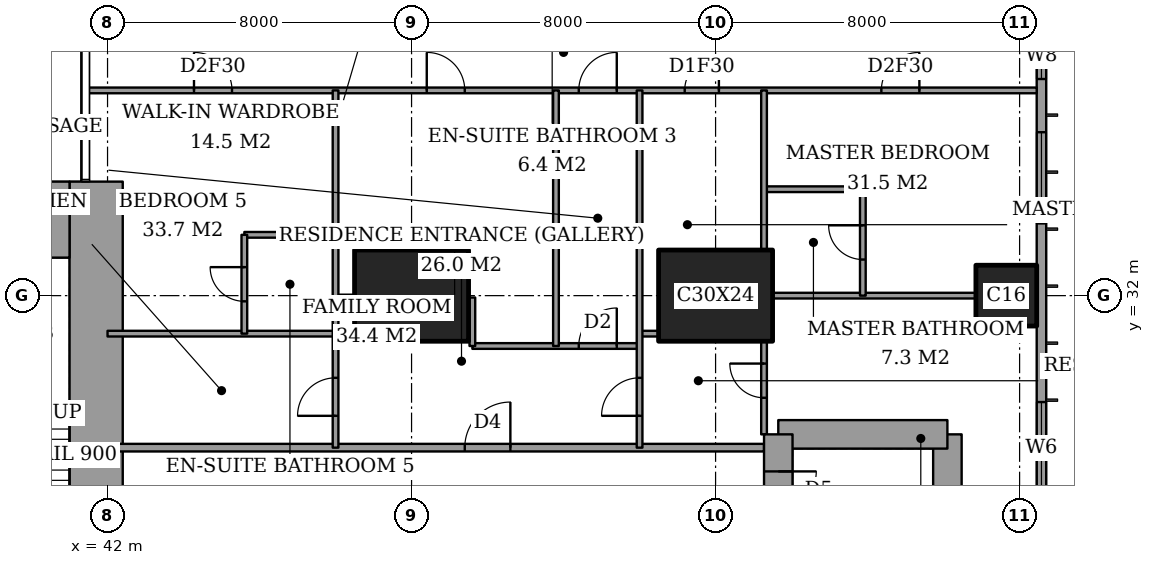
"""IFC4 building model, lengths in metres.
Left out: names, types, materials, properties, quantities, classifications, styles, units other than length and angle.
Written with IfcOpenShell. Run it as: python <this file> out.ifc"""

import sys

from ifc_helpers import new_model, si_unit, direction, frame, frame_2d, origin, origin_2d, place, context, subcontext, project, spatial, rectangle, extrude, element, fill, save


model = new_model("IFC4")
c1 = context("Model", 3, precision=1e-05, world=origin(), true_north=direction((0.0, 1.0)))
c2 = subcontext(c1, "Body", "Model", "MODEL_VIEW")
j1 = project(units=[si_unit("LENGTHUNIT", "METRE"), si_unit("PLANEANGLEUNIT", "RADIAN")], contexts=[c1])
p1 = place(None, origin())
s1 = spatial("IfcSite", under=j1, at=p1, CompositionType="ELEMENT")
p2 = place(p1, origin())
s2 = spatial("IfcBuilding", under=s1, at=p2, CompositionType="ELEMENT")
p3 = place(p2, frame((0.0, 0.0, 252.0)))
s3 = spatial("IfcBuildingStorey", under=s2, at=p3, CompositionType="ELEMENT", Elevation=252.0)
for number, where, z_axis, x_axis in (
    (1, (50.0, 32.0, 0.0), (0.0, 0.0, 1.0), (1.0, 0.0, 0.0)),
    (2, (58.0, 32.0, 0.0), (0.0, 0.0, 1.0), (1.0, 0.0, 0.0)),
):
    element("IfcColumn", number, at=place(p3, frame(where, z_axis=z_axis, x_axis=x_axis)), inside=s3, PredefinedType="COLUMN", context=c2, shape_type="SweptSolid", body=[
        extrude(rectangle(XDim=3.0, YDim=2.4, at=origin_2d()), origin(), (0.0, 0.0, 1.0), 3.6),
    ])
p4 = place(p3, frame((65.65, 32.0, 0.0), z_axis=(0.0, 0.0, 1.0), x_axis=(1.0, 0.0, 0.0)))
e3 = element("IfcColumn", 3, at=p4, inside=s3, PredefinedType="COLUMN", context=c2, shape_type="SweptSolid", body=[
    extrude(rectangle(XDim=1.6, YDim=1.6, at=origin_2d()), origin(), (0.0, 0.0, 1.0), 3.6),
])
p5 = place(p3, frame((37.85, 34.0, 0.0), z_axis=(0.0, 0.0, 1.0), x_axis=(1.0, 0.0, 0.0)))
e4 = element("IfcWall", 4, at=p5, inside=s3, PredefinedType="SHEAR", context=c2, shape_type="SweptSolid", body=[
    extrude(rectangle(XDim=3.15, YDim=2.0, at=frame_2d((1.575, 0.0))), origin(), (0.0, 0.0, 1.0), 3.6),
])
p6 = place(p3, frame((41.7, 24.85, 0.0), z_axis=(0.0, 0.0, 1.0), x_axis=(0.0, 1.0, 0.0)))
e5 = element("IfcWall", 5, at=p6, inside=s3, PredefinedType="SHEAR", context=c2, shape_type="SweptSolid", body=[
    extrude(rectangle(XDim=10.15, YDim=1.4, at=frame_2d((5.075, 0.0))), origin(), (0.0, 0.0, 1.0), 3.6),
])
p7 = place(p3, frame((64.1, 19.65, 0.0), z_axis=(0.0, 0.0, 1.0), x_axis=(0.0, 1.0, 0.0)))
e6 = element("IfcWall", 6, at=p7, inside=s3, PredefinedType="SHEAR", context=c2, shape_type="SweptSolid", body=[
    extrude(rectangle(XDim=8.7, YDim=0.75, at=frame_2d((4.35, 0.0))), origin(), (0.0, 0.0, 1.0), 3.6),
])
p8 = place(p3, frame((64.1, 28.35, 0.0), z_axis=(0.0, 0.0, 1.0), x_axis=(-1.0, 0.0, 0.0)))
e7 = element("IfcWall", 7, at=p8, inside=s3, PredefinedType="SHEAR", context=c2, shape_type="SweptSolid", body=[
    extrude(rectangle(XDim=4.45, YDim=0.75, at=frame_2d((2.225, 0.0))), origin(), (0.0, 0.0, 1.0), 3.6),
])
p9 = place(p3, frame((59.65, 28.35, 0.0), z_axis=(0.0, 0.0, 1.0), x_axis=(0.0, -1.0, 0.0)))
e8 = element("IfcWall", 8, at=p9, inside=s3, PredefinedType="SHEAR", context=c2, shape_type="SweptSolid", body=[
    extrude(rectangle(XDim=8.7, YDim=0.75, at=frame_2d((4.35, 0.0))), origin(), (0.0, 0.0, 1.0), 3.6),
])
p10 = place(p9, frame((0.975, 0.0, 0.0)))
e9 = element("IfcOpeningElement", 9, at=p10, cuts=e8, PredefinedType="OPENING", context=c2, shape_type="SweptSolid", body=[
    extrude(rectangle(XDim=1.0, YDim=2.1, at=frame_2d((0.5, 1.05))), frame((0.0, 0.385, 0.0), z_axis=(0.0, -1.0, 0.0), x_axis=(1.0, 0.0, 0.0)), (0.0, 0.0, 1.0), 0.77),
])
p11 = place(p3, frame((66.575, 3.175, 0.0), z_axis=(0.0, 0.0, 1.0), x_axis=(0.0, 1.0, 0.0)))
e10 = element("IfcWall", 10, at=p11, inside=s3, PredefinedType="SOLIDWALL", context=c2, shape_type="SweptSolid", body=[
    extrude(rectangle(XDim=41.65, YDim=0.25, at=frame_2d((20.825, 0.0))), origin(), (0.0, 0.0, 1.0), 3.6),
])
p12 = place(p11, frame((0.875, 0.0, 0.6)))
e11 = element("IfcOpeningElement", 11, at=p12, cuts=e10, PredefinedType="OPENING", context=c2, shape_type="SweptSolid", body=[
    extrude(rectangle(XDim=2.4, YDim=2.0, at=frame_2d((1.2, 1.0))), frame((0.0, 0.135, 0.0), z_axis=(0.0, -1.0, 0.0), x_axis=(1.0, 0.0, 0.0)), (0.0, 0.0, 1.0), 0.27),
])
p13 = place(p11, frame((6.6, 0.0, 0.6)))
e12 = element("IfcOpeningElement", 12, at=p13, cuts=e10, PredefinedType="OPENING", context=c2, shape_type="SweptSolid", body=[
    extrude(rectangle(XDim=1.2, YDim=2.0, at=frame_2d((0.6, 1.0))), frame((0.0, 0.135, 0.0), z_axis=(0.0, -1.0, 0.0), x_axis=(1.0, 0.0, 0.0)), (0.0, 0.0, 1.0), 0.27),
])
p14 = place(p11, frame((8.825, 0.0, 0.6)))
e13 = element("IfcOpeningElement", 13, at=p14, cuts=e10, PredefinedType="OPENING", context=c2, shape_type="SweptSolid", body=[
    extrude(rectangle(XDim=2.4, YDim=2.0, at=frame_2d((1.2, 1.0))), frame((0.0, 0.135, 0.0), z_axis=(0.0, -1.0, 0.0), x_axis=(1.0, 0.0, 0.0)), (0.0, 0.0, 1.0), 0.27),
])
p15 = place(p11, frame((15.725, 0.0, 0.6)))
e14 = element("IfcOpeningElement", 14, at=p15, cuts=e10, PredefinedType="OPENING", context=c2, shape_type="SweptSolid", body=[
    extrude(rectangle(XDim=2.4, YDim=2.0, at=frame_2d((1.2, 1.0))), frame((0.0, 0.135, 0.0), z_axis=(0.0, -1.0, 0.0), x_axis=(1.0, 0.0, 0.0)), (0.0, 0.0, 1.0), 0.27),
])
p16 = place(p11, frame((23.625, 0.0, 0.6)))
e15 = element("IfcOpeningElement", 15, at=p16, cuts=e10, PredefinedType="OPENING", context=c2, shape_type="SweptSolid", body=[
    extrude(rectangle(XDim=2.4, YDim=2.0, at=frame_2d((1.2, 1.0))), frame((0.0, 0.135, 0.0), z_axis=(0.0, -1.0, 0.0), x_axis=(1.0, 0.0, 0.0)), (0.0, 0.0, 1.0), 0.27),
])
p17 = place(p11, frame((30.725, 0.0, 0.6)))
e16 = element("IfcOpeningElement", 16, at=p17, cuts=e10, PredefinedType="OPENING", context=c2, shape_type="SweptSolid", body=[
    extrude(rectangle(XDim=2.4, YDim=2.0, at=frame_2d((1.2, 1.0))), frame((0.0, 0.135, 0.0), z_axis=(0.0, -1.0, 0.0), x_axis=(1.0, 0.0, 0.0)), (0.0, 0.0, 1.0), 0.27),
])
p18 = place(p11, frame((34.525, 0.0, 0.6)))
e17 = element("IfcOpeningElement", 17, at=p18, cuts=e10, PredefinedType="OPENING", context=c2, shape_type="SweptSolid", body=[
    extrude(rectangle(XDim=1.2, YDim=2.0, at=frame_2d((0.6, 1.0))), frame((0.0, 0.135, 0.0), z_axis=(0.0, -1.0, 0.0), x_axis=(1.0, 0.0, 0.0)), (0.0, 0.0, 1.0), 0.27),
])
p19 = place(p11, frame((38.375, 0.0, 0.6)))
e18 = element("IfcOpeningElement", 18, at=p19, cuts=e10, PredefinedType="OPENING", context=c2, shape_type="SweptSolid", body=[
    extrude(rectangle(XDim=2.4, YDim=2.0, at=frame_2d((1.2, 1.0))), frame((0.0, 0.135, 0.0), z_axis=(0.0, -1.0, 0.0), x_axis=(1.0, 0.0, 0.0)), (0.0, 0.0, 1.0), 0.27),
])
p20 = place(p3, frame((42.0, 28.0, 0.0), z_axis=(0.0, 0.0, 1.0), x_axis=(1.0, 0.0, 0.0)))
e19 = element("IfcWall", 19, at=p20, inside=s3, PredefinedType="PARTITIONING", context=c2, shape_type="SweptSolid", body=[
    extrude(rectangle(XDim=17.275, YDim=0.2, at=frame_2d((8.637, 0.0))), origin(), (0.0, 0.0, 1.0), 3.35),
])
p21 = place(p20, frame((9.4, 0.0, 0.0)))
e20 = element("IfcOpeningElement", 20, at=p21, cuts=e19, PredefinedType="OPENING", context=c2, shape_type="SweptSolid", body=[
    extrude(rectangle(XDim=1.2, YDim=2.4, at=frame_2d((0.6, 1.2))), frame((0.0, 0.11, 0.0), z_axis=(0.0, -1.0, 0.0), x_axis=(1.0, 0.0, 0.0)), (0.0, 0.0, 1.0), 0.22),
])
p22 = place(p3, frame((51.6, 30.675, 0.0), z_axis=(0.0, 0.0, 1.0), x_axis=(1.0, 0.0, 0.0)))
e21 = element("IfcWall", 21, at=p22, inside=s3, PredefinedType="PARTITIONING", context=c2, shape_type="SweptSolid", body=[
    extrude(rectangle(XDim=4.4, YDim=0.15, at=frame_2d((2.2, 0.0))), origin(), (0.0, 0.0, 1.0), 3.35),
])
p23 = place(p22, frame((2.8, 0.0, 0.0)))
e22 = element("IfcOpeningElement", 22, at=p23, cuts=e21, PredefinedType="OPENING", context=c2, shape_type="SweptSolid", body=[
    extrude(rectangle(XDim=1.0, YDim=2.1, at=frame_2d((0.5, 1.05))), frame((0.0, 0.085, 0.0), z_axis=(0.0, -1.0, 0.0), x_axis=(1.0, 0.0, 0.0)), (0.0, 0.0, 1.0), 0.17),
])
p24 = place(p3, frame((42.0, 31.0, 0.0), z_axis=(0.0, 0.0, 1.0), x_axis=(1.0, 0.0, 0.0)))
e23 = element("IfcWall", 23, at=p24, inside=s3, PredefinedType="PARTITIONING", context=c2, shape_type="SweptSolid", body=[
    extrude(rectangle(XDim=6.0, YDim=0.15, at=frame_2d((3.0, 0.0))), origin(), (0.0, 0.0, 1.0), 3.35),
])
p25 = place(p3, frame((56.0, 31.0, 0.0), z_axis=(0.0, 0.0, 1.0), x_axis=(1.0, 0.0, 0.0)))
e24 = element("IfcWall", 24, at=p25, inside=s3, PredefinedType="PARTITIONING", context=c2, shape_type="SweptSolid", body=[
    extrude(rectangle(XDim=0.5, YDim=0.15, at=frame_2d((0.25, 0.0))), origin(), (0.0, 0.0, 1.0), 3.35),
])
p26 = place(p3, frame((48.0, 31.95, 0.0), z_axis=(0.0, 0.0, 1.0), x_axis=(1.0, 0.0, 0.0)))
e25 = element("IfcWall", 25, at=p26, inside=s3, PredefinedType="PARTITIONING", context=c2, shape_type="SweptSolid", body=[
    extrude(rectangle(XDim=0.5, YDim=0.15, at=frame_2d((0.25, 0.0))), origin(), (0.0, 0.0, 1.0), 2.634),
])
p27 = place(p3, frame((59.5, 32.0, 0.0), z_axis=(0.0, 0.0, 1.0), x_axis=(1.0, 0.0, 0.0)))
e26 = element("IfcWall", 26, at=p27, inside=s3, PredefinedType="PARTITIONING", context=c2, shape_type="SweptSolid", body=[
    extrude(rectangle(XDim=5.35, YDim=0.15, at=frame_2d((2.675, 0.0))), origin(), (0.0, 0.0, 1.0), 2.634),
])
p28 = place(p3, frame((45.6, 33.6, 0.0), z_axis=(0.0, 0.0, 1.0), x_axis=(1.0, 0.0, 0.0)))
e27 = element("IfcWall", 27, at=p28, inside=s3, PredefinedType="PARTITIONING", context=c2, shape_type="SweptSolid", body=[
    extrude(rectangle(XDim=2.4, YDim=0.15, at=frame_2d((1.2, 0.0))), origin(), (0.0, 0.0, 1.0), 3.35),
])
p29 = place(p3, frame((59.275, 34.8, 0.0), z_axis=(0.0, 0.0, 1.0), x_axis=(1.0, 0.0, 0.0)))
e28 = element("IfcWall", 28, at=p29, inside=s3, PredefinedType="PARTITIONING", context=c2, shape_type="SweptSolid", body=[
    extrude(rectangle(XDim=2.6, YDim=0.15, at=frame_2d((1.3, 0.0))), origin(), (0.0, 0.0, 1.0), 3.35),
])
p30 = place(p3, frame((41.439, 37.4, 0.0), z_axis=(0.0, 0.0, 1.0), x_axis=(1.0, 0.0, 0.0)))
e29 = element("IfcWall", 29, at=p30, inside=s3, PredefinedType="PARTITIONING", context=c2, shape_type="SweptSolid", body=[
    extrude(rectangle(XDim=25.011, YDim=0.15, at=frame_2d((12.505, 0.0))), origin(), (0.0, 0.0, 1.0), 3.35),
])
p31 = place(p30, frame((12.961, 0.0, 0.0)))
e30 = element("IfcOpeningElement", 30, at=p31, cuts=e29, PredefinedType="OPENING", context=c2, shape_type="SweptSolid", body=[
    extrude(rectangle(XDim=1.0, YDim=2.1, at=frame_2d((0.5, 1.05))), frame((0.0, 0.085, 0.0), z_axis=(0.0, -1.0, 0.0), x_axis=(1.0, 0.0, 0.0)), (0.0, 0.0, 1.0), 0.17),
])
p32 = place(p30, frame((20.924, 0.0, 0.0)))
e31 = element("IfcOpeningElement", 31, at=p32, cuts=e29, PredefinedType="OPENING", context=c2, shape_type="SweptSolid", body=[
    extrude(rectangle(XDim=1.0, YDim=2.1, at=frame_2d((0.5, 1.05))), frame((0.0, 0.085, 0.0), z_axis=(0.0, -1.0, 0.0), x_axis=(1.0, 0.0, 0.0)), (0.0, 0.0, 1.0), 0.17),
])
p33 = place(p30, frame((15.749, 0.0, 0.0)))
e32 = element("IfcOpeningElement", 32, at=p33, cuts=e29, PredefinedType="OPENING", context=c2, shape_type="SweptSolid", body=[
    extrude(rectangle(XDim=0.9, YDim=2.1, at=frame_2d((0.45, 1.05))), frame((0.0, 0.085, 0.0), z_axis=(0.0, -1.0, 0.0), x_axis=(1.0, 0.0, 0.0)), (0.0, 0.0, 1.0), 0.17),
])
p34 = place(p30, frame((8.961, 0.0, 0.0)))
e33 = element("IfcOpeningElement", 33, at=p34, cuts=e29, PredefinedType="OPENING", context=c2, shape_type="SweptSolid", body=[
    extrude(rectangle(XDim=1.0, YDim=2.1, at=frame_2d((0.5, 1.05))), frame((0.0, 0.085, 0.0), z_axis=(0.0, -1.0, 0.0), x_axis=(1.0, 0.0, 0.0)), (0.0, 0.0, 1.0), 0.17),
])
p35 = place(p30, frame((2.836, 0.0, 0.0)))
e34 = element("IfcOpeningElement", 34, at=p35, cuts=e29, PredefinedType="OPENING", context=c2, shape_type="SweptSolid", body=[
    extrude(rectangle(XDim=1.0, YDim=2.1, at=frame_2d((0.5, 1.05))), frame((0.0, 0.085, 0.0), z_axis=(0.0, -1.0, 0.0), x_axis=(1.0, 0.0, 0.0)), (0.0, 0.0, 1.0), 0.17),
])
p36 = place(p3, frame((45.6, 31.0, 0.0), z_axis=(0.0, 0.0, 1.0), x_axis=(0.0, 1.0, 0.0)))
e35 = element("IfcWall", 35, at=p36, inside=s3, PredefinedType="PARTITIONING", context=c2, shape_type="SweptSolid", body=[
    extrude(rectangle(XDim=2.6, YDim=0.15, at=frame_2d((1.3, 0.0))), origin(), (0.0, 0.0, 1.0), 3.35),
])
p37 = place(p36, frame((0.85, 0.0, 0.0)))
e36 = element("IfcOpeningElement", 36, at=p37, cuts=e35, PredefinedType="OPENING", context=c2, shape_type="SweptSolid", body=[
    extrude(rectangle(XDim=0.9, YDim=2.1, at=frame_2d((0.45, 1.05))), frame((0.0, 0.085, 0.0), z_axis=(0.0, -1.0, 0.0), x_axis=(1.0, 0.0, 0.0)), (0.0, 0.0, 1.0), 0.17),
])
p38 = place(p3, frame((48.0, 28.0, 0.0), z_axis=(0.0, 0.0, 1.0), x_axis=(0.0, 1.0, 0.0)))
e37 = element("IfcWall", 37, at=p38, inside=s3, PredefinedType="PARTITIONING", context=c2, shape_type="SweptSolid", body=[
    extrude(rectangle(XDim=9.4, YDim=0.15, at=frame_2d((4.7, 0.0))), origin(), (0.0, 0.0, 1.0), 3.35),
])
p39 = place(p38, frame((0.837, 0.0, 0.0)))
e38 = element("IfcOpeningElement", 38, at=p39, cuts=e37, PredefinedType="OPENING", context=c2, shape_type="SweptSolid", body=[
    extrude(rectangle(XDim=1.0, YDim=2.1, at=frame_2d((0.5, 1.05))), frame((0.0, 0.085, 0.0), z_axis=(0.0, -1.0, 0.0), x_axis=(1.0, 0.0, 0.0)), (0.0, 0.0, 1.0), 0.17),
])
p40 = place(p3, frame((51.6, 30.675, 0.0), z_axis=(0.0, 0.0, 1.0), x_axis=(0.0, 1.0, 0.0)))
e39 = element("IfcWall", 39, at=p40, inside=s3, PredefinedType="PARTITIONING", context=c2, shape_type="SweptSolid", body=[
    extrude(rectangle(XDim=1.275, YDim=0.15, at=frame_2d((0.637, 0.0))), origin(), (0.0, 0.0, 1.0), 3.35),
])
p41 = place(p3, frame((53.8, 30.675, 0.0), z_axis=(0.0, 0.0, 1.0), x_axis=(0.0, 1.0, 0.0)))
e40 = element("IfcWall", 40, at=p41, inside=s3, PredefinedType="PARTITIONING", context=c2, shape_type="SweptSolid", body=[
    extrude(rectangle(XDim=6.725, YDim=0.15, at=frame_2d((3.362, 0.0))), origin(), (0.0, 0.0, 1.0), 3.35),
])
p42 = place(p3, frame((56.0, 28.0, 0.0), z_axis=(0.0, 0.0, 1.0), x_axis=(0.0, 1.0, 0.0)))
e41 = element("IfcWall", 41, at=p42, inside=s3, PredefinedType="PARTITIONING", context=c2, shape_type="SweptSolid", body=[
    extrude(rectangle(XDim=9.4, YDim=0.15, at=frame_2d((4.7, 0.0))), origin(), (0.0, 0.0, 1.0), 3.35),
])
p43 = place(p42, frame((0.837, 0.0, 0.0)))
e42 = element("IfcOpeningElement", 42, at=p43, cuts=e41, PredefinedType="OPENING", context=c2, shape_type="SweptSolid", body=[
    extrude(rectangle(XDim=1.0, YDim=2.1, at=frame_2d((0.5, 1.05))), frame((0.0, 0.085, 0.0), z_axis=(0.0, -1.0, 0.0), x_axis=(1.0, 0.0, 0.0)), (0.0, 0.0, 1.0), 0.17),
])
p44 = place(p3, frame((59.275, 28.35, 0.0), z_axis=(0.0, 0.0, 1.0), x_axis=(0.0, 1.0, 0.0)))
e43 = element("IfcWall", 43, at=p44, inside=s3, PredefinedType="PARTITIONING", context=c2, shape_type="SweptSolid", body=[
    extrude(rectangle(XDim=2.45, YDim=0.15, at=frame_2d((1.225, 0.0))), origin(), (0.0, 0.0, 1.0), 3.35),
])
p45 = place(p44, frame((0.962, 0.0, 0.0)))
e44 = element("IfcOpeningElement", 44, at=p45, cuts=e43, PredefinedType="OPENING", context=c2, shape_type="SweptSolid", body=[
    extrude(rectangle(XDim=0.9, YDim=2.1, at=frame_2d((0.45, 1.05))), frame((0.0, 0.085, 0.0), z_axis=(0.0, -1.0, 0.0), x_axis=(1.0, 0.0, 0.0)), (0.0, 0.0, 1.0), 0.17),
])
p46 = place(p3, frame((59.275, 33.2, 0.0), z_axis=(0.0, 0.0, 1.0), x_axis=(0.0, 1.0, 0.0)))
e45 = element("IfcWall", 45, at=p46, inside=s3, PredefinedType="PARTITIONING", context=c2, shape_type="SweptSolid", body=[
    extrude(rectangle(XDim=4.2, YDim=0.15, at=frame_2d((2.1, 0.0))), origin(), (0.0, 0.0, 1.0), 3.35),
])
p47 = place(p3, frame((61.875, 32.0, 0.0), z_axis=(0.0, 0.0, 1.0), x_axis=(0.0, 1.0, 0.0)))
e46 = element("IfcWall", 46, at=p47, inside=s3, PredefinedType="PARTITIONING", context=c2, shape_type="SweptSolid", body=[
    extrude(rectangle(XDim=2.8, YDim=0.15, at=frame_2d((1.4, 0.0))), origin(), (0.0, 0.0, 1.0), 3.35),
])
p48 = place(p47, frame((0.95, 0.0, 0.0)))
e47 = element("IfcOpeningElement", 47, at=p48, cuts=e46, PredefinedType="OPENING", context=c2, shape_type="SweptSolid", body=[
    extrude(rectangle(XDim=0.9, YDim=2.1, at=frame_2d((0.45, 1.05))), frame((0.0, 0.085, 0.0), z_axis=(0.0, -1.0, 0.0), x_axis=(1.0, 0.0, 0.0)), (0.0, 0.0, 1.0), 0.17),
])
p49 = place(p16, origin())
e48 = element("IfcWindow", 48, at=p49, inside=s3, PartitioningType="SINGLE_PANEL", PredefinedType="WINDOW", context=c2, shape_type="SweptSolid", body=[
    extrude(rectangle(XDim=2.4, YDim=2.0, at=frame_2d((1.2, 1.0))), frame((0.0, 0.03, 0.0), z_axis=(0.0, -1.0, 0.0), x_axis=(1.0, 0.0, 0.0)), (0.0, 0.0, 1.0), 0.06),
])
fill(e15, e48)
p50 = place(p17, origin())
e49 = element("IfcWindow", 49, at=p50, inside=s3, PartitioningType="SINGLE_PANEL", PredefinedType="WINDOW", context=c2, shape_type="SweptSolid", body=[
    extrude(rectangle(XDim=2.4, YDim=2.0, at=frame_2d((1.2, 1.0))), frame((0.0, 0.03, 0.0), z_axis=(0.0, -1.0, 0.0), x_axis=(1.0, 0.0, 0.0)), (0.0, 0.0, 1.0), 0.06),
])
fill(e16, e49)
p51 = place(p18, origin())
e50 = element("IfcWindow", 50, at=p51, inside=s3, PartitioningType="SINGLE_PANEL", PredefinedType="WINDOW", context=c2, shape_type="SweptSolid", body=[
    extrude(rectangle(XDim=1.2, YDim=2.0, at=frame_2d((0.6, 1.0))), frame((0.0, 0.03, 0.0), z_axis=(0.0, -1.0, 0.0), x_axis=(1.0, 0.0, 0.0)), (0.0, 0.0, 1.0), 0.06),
])
fill(e17, e50)
p52 = place(p31, origin())
e51 = element("IfcDoor", 51, at=p52, inside=s3, OperationType="SINGLE_SWING_LEFT", PredefinedType="DOOR", context=c2, shape_type="SweptSolid", body=[
    extrude(rectangle(XDim=1.0, YDim=2.1, at=frame_2d((0.5, 1.05))), frame((0.0, 0.025, 0.0), z_axis=(0.0, -1.0, 0.0), x_axis=(1.0, 0.0, 0.0)), (0.0, 0.0, 1.0), 0.05),
])
fill(e30, e51)
p53 = place(p48, origin())
e52 = element("IfcDoor", 52, at=p53, inside=s3, OperationType="SINGLE_SWING_LEFT", PredefinedType="DOOR", context=c2, shape_type="SweptSolid", body=[
    extrude(rectangle(XDim=0.9, YDim=2.1, at=frame_2d((0.45, 1.05))), frame((0.0, 0.025, 0.0), z_axis=(0.0, -1.0, 0.0), x_axis=(1.0, 0.0, 0.0)), (0.0, 0.0, 1.0), 0.05),
])
fill(e47, e52)
p54 = place(p32, origin())
e53 = element("IfcDoor", 53, at=p54, inside=s3, OperationType="SINGLE_SWING_LEFT", PredefinedType="DOOR", context=c2, shape_type="SweptSolid", body=[
    extrude(rectangle(XDim=1.0, YDim=2.1, at=frame_2d((0.5, 1.05))), frame((0.0, 0.025, 0.0), z_axis=(0.0, -1.0, 0.0), x_axis=(1.0, 0.0, 0.0)), (0.0, 0.0, 1.0), 0.05),
])
fill(e31, e53)
p55 = place(p45, origin())
e54 = element("IfcDoor", 54, at=p55, inside=s3, OperationType="SINGLE_SWING_LEFT", PredefinedType="DOOR", context=c2, shape_type="SweptSolid", body=[
    extrude(rectangle(XDim=0.9, YDim=2.1, at=frame_2d((0.45, 1.05))), frame((0.0, 0.025, 0.0), z_axis=(0.0, -1.0, 0.0), x_axis=(1.0, 0.0, 0.0)), (0.0, 0.0, 1.0), 0.05),
])
fill(e44, e54)
p56 = place(p33, origin())
e55 = element("IfcDoor", 55, at=p56, inside=s3, OperationType="SINGLE_SWING_LEFT", PredefinedType="DOOR", context=c2, shape_type="SweptSolid", body=[
    extrude(rectangle(XDim=0.9, YDim=2.1, at=frame_2d((0.45, 1.05))), frame((0.0, 0.025, 0.0), z_axis=(0.0, -1.0, 0.0), x_axis=(1.0, 0.0, 0.0)), (0.0, 0.0, 1.0), 0.05),
])
fill(e32, e55)
p57 = place(p43, origin())
e56 = element("IfcDoor", 56, at=p57, inside=s3, OperationType="SINGLE_SWING_RIGHT", PredefinedType="DOOR", context=c2, shape_type="SweptSolid", body=[
    extrude(rectangle(XDim=1.0, YDim=2.1, at=frame_2d((0.5, 1.05))), frame((0.0, 0.025, 0.0), z_axis=(0.0, -1.0, 0.0), x_axis=(1.0, 0.0, 0.0)), (0.0, 0.0, 1.0), 0.05),
])
fill(e42, e56)
p58 = place(p21, origin())
e57 = element("IfcDoor", 57, at=p58, inside=s3, OperationType="SINGLE_SWING_LEFT", PredefinedType="DOOR", context=c2, shape_type="SweptSolid", body=[
    extrude(rectangle(XDim=1.2, YDim=2.4, at=frame_2d((0.6, 1.2))), frame((0.0, 0.025, 0.0), z_axis=(0.0, -1.0, 0.0), x_axis=(1.0, 0.0, 0.0)), (0.0, 0.0, 1.0), 0.05),
])
fill(e20, e57)
p59 = place(p23, origin())
e58 = element("IfcDoor", 58, at=p59, inside=s3, OperationType="SINGLE_SWING_LEFT", PredefinedType="DOOR", context=c2, shape_type="SweptSolid", body=[
    extrude(rectangle(XDim=1.0, YDim=2.1, at=frame_2d((0.5, 1.05))), frame((0.0, 0.025, 0.0), z_axis=(0.0, -1.0, 0.0), x_axis=(1.0, 0.0, 0.0)), (0.0, 0.0, 1.0), 0.05),
])
fill(e22, e58)
p60 = place(p34, origin())
e59 = element("IfcDoor", 59, at=p60, inside=s3, OperationType="SINGLE_SWING_RIGHT", PredefinedType="DOOR", context=c2, shape_type="SweptSolid", body=[
    extrude(rectangle(XDim=1.0, YDim=2.1, at=frame_2d((0.5, 1.05))), frame((0.0, 0.025, 0.0), z_axis=(0.0, -1.0, 0.0), x_axis=(1.0, 0.0, 0.0)), (0.0, 0.0, 1.0), 0.05),
])
fill(e33, e59)
p61 = place(p37, origin())
e60 = element("IfcDoor", 60, at=p61, inside=s3, OperationType="SINGLE_SWING_LEFT", PredefinedType="DOOR", context=c2, shape_type="SweptSolid", body=[
    extrude(rectangle(XDim=0.9, YDim=2.1, at=frame_2d((0.45, 1.05))), frame((0.0, 0.025, 0.0), z_axis=(0.0, -1.0, 0.0), x_axis=(1.0, 0.0, 0.0)), (0.0, 0.0, 1.0), 0.05),
])
fill(e36, e60)
p62 = place(p35, origin())
e61 = element("IfcDoor", 61, at=p62, inside=s3, OperationType="SINGLE_SWING_RIGHT", PredefinedType="DOOR", context=c2, shape_type="SweptSolid", body=[
    extrude(rectangle(XDim=1.0, YDim=2.1, at=frame_2d((0.5, 1.05))), frame((0.0, 0.025, 0.0), z_axis=(0.0, -1.0, 0.0), x_axis=(1.0, 0.0, 0.0)), (0.0, 0.0, 1.0), 0.05),
])
fill(e34, e61)
p63 = place(p39, origin())
e62 = element("IfcDoor", 62, at=p63, inside=s3, OperationType="SINGLE_SWING_RIGHT", PredefinedType="DOOR", context=c2, shape_type="SweptSolid", body=[
    extrude(rectangle(XDim=1.0, YDim=2.1, at=frame_2d((0.5, 1.05))), frame((0.0, 0.025, 0.0), z_axis=(0.0, -1.0, 0.0), x_axis=(1.0, 0.0, 0.0)), (0.0, 0.0, 1.0), 0.05),
])
fill(e38, e62)
p64 = place(p10, origin())
e63 = element("IfcDoor", 63, at=p64, inside=s3, OperationType="SINGLE_SWING_RIGHT", PredefinedType="DOOR", context=c2, shape_type="SweptSolid", body=[
    extrude(rectangle(XDim=1.0, YDim=2.1, at=frame_2d((0.5, 1.05))), frame((0.0, 0.025, 0.0), z_axis=(0.0, -1.0, 0.0), x_axis=(1.0, 0.0, 0.0)), (0.0, 0.0, 1.0), 0.05),
])
fill(e9, e63)
save(model, sys.argv[1])
